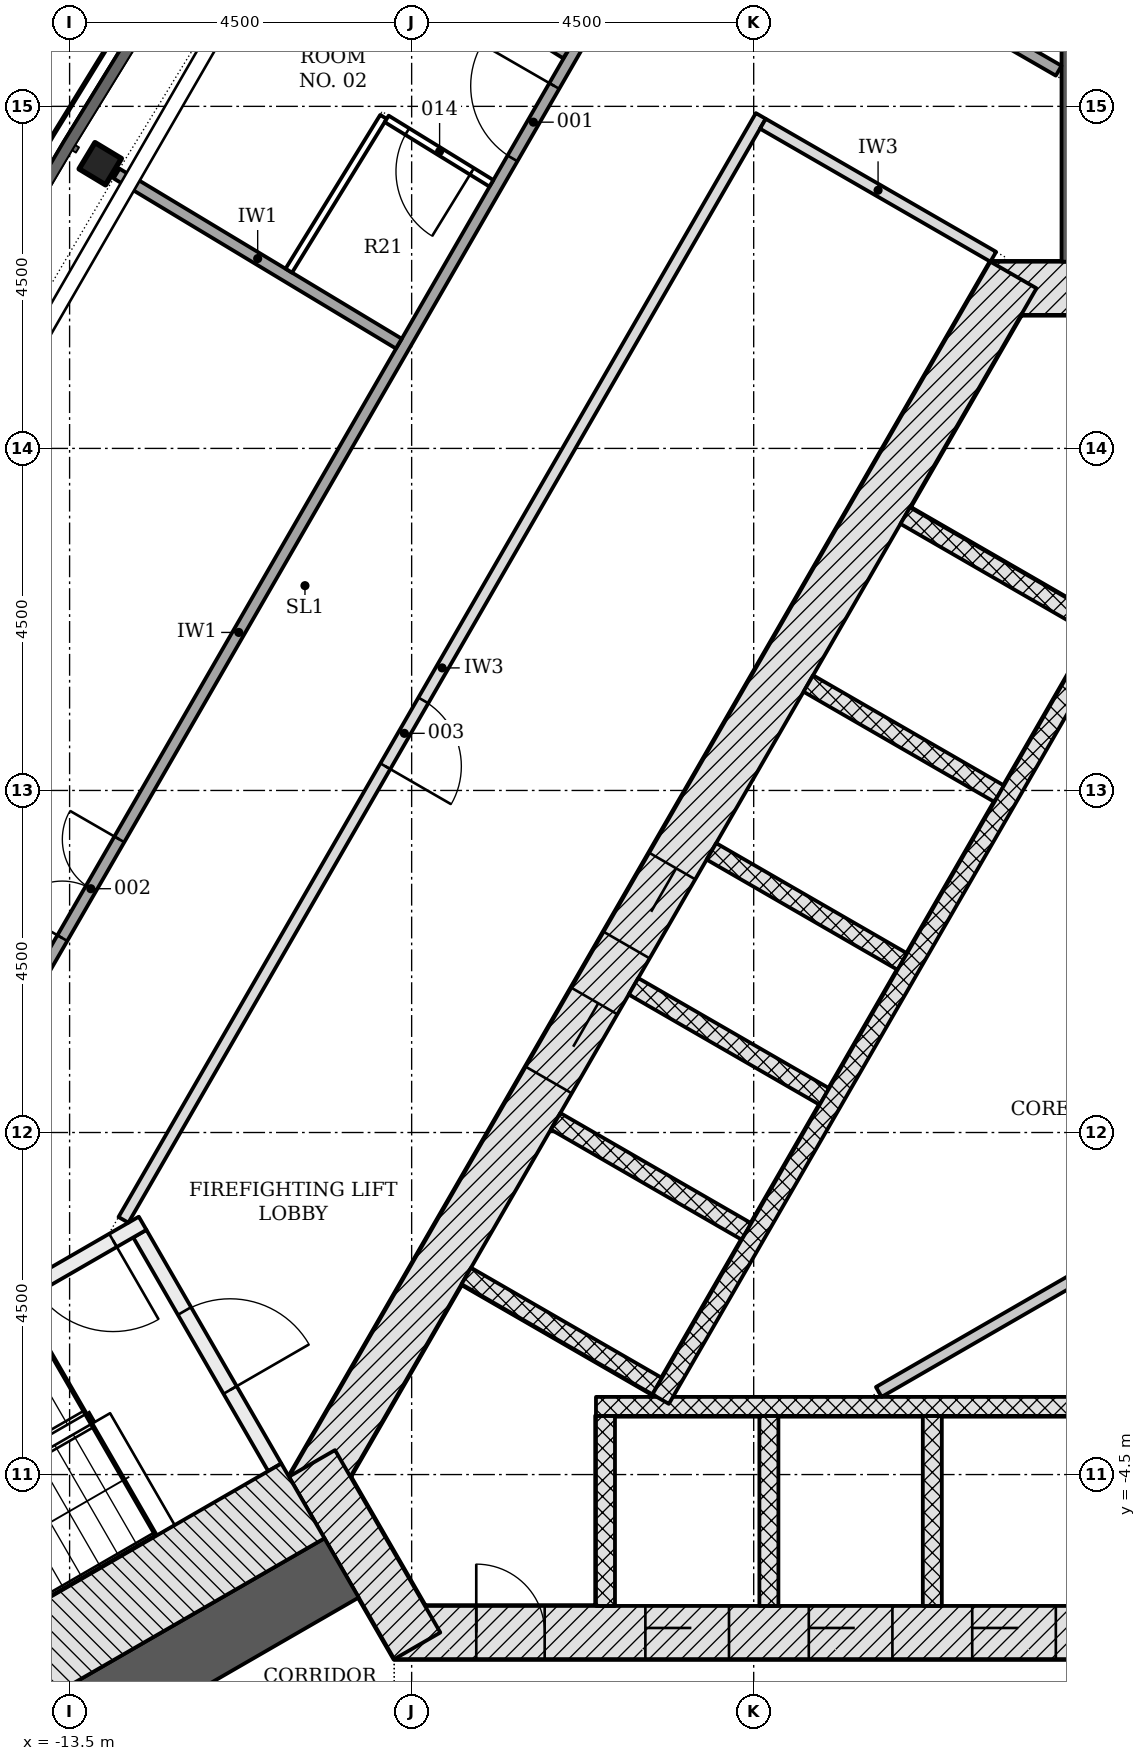
"""IFC4 building model, lengths in metres.
Left out: names, types, materials, properties, quantities, classifications, styles, units other than length and angle.
Written with IfcOpenShell. Run it as: python <this file> out.ifc"""

import sys

from ifc_helpers import new_model, si_unit, direction, frame, frame_2d, origin, origin_2d, place, context, subcontext, project, spatial, rectangle, i_section, extrude, element, fill, save


model = new_model("IFC4")
c1 = context("Model", 3, precision=1e-05, world=origin(), true_north=direction((0.0, 1.0)))
c2 = subcontext(c1, "Body", "Model", "MODEL_VIEW")
j1 = project(units=[si_unit("LENGTHUNIT", "METRE"), si_unit("PLANEANGLEUNIT", "RADIAN")], contexts=[c1])
p1 = place(None, origin())
s1 = spatial("IfcSite", under=j1, at=p1, CompositionType="ELEMENT")
p2 = place(p1, origin())
s2 = spatial("IfcBuilding", under=s1, at=p2, CompositionType="ELEMENT")
p3 = place(p2, frame((0.0, 0.0, 34.8)))
s3 = spatial("IfcBuildingStorey", under=s2, at=p3, CompositionType="ELEMENT", Elevation=34.8)
p4 = place(p3, frame((-9.229, -6.578, -0.2), z_axis=(0.0, 0.0, 1.0), x_axis=(1.0, 0.0, 0.0)))
e1 = element("IfcWall", 1, at=p4, inside=s3, PredefinedType="SHEAR", context=c2, shape_type="SweptSolid", body=[
    extrude(rectangle(XDim=18.458, YDim=0.7, at=frame_2d((9.229, 0.0))), origin(), (0.0, 0.0, 1.0), 3.6),
])
p5 = place(p4, frame((3.304, 0.0, 0.2)))
e2 = element("IfcOpeningElement", 2, at=p5, cuts=e1, PredefinedType="OPENING", context=c2, shape_type="SweptSolid", body=[
    extrude(rectangle(XDim=1.1, YDim=2.1, at=frame_2d((0.55, 1.05))), frame((0.0, 0.36, 0.0), z_axis=(0.0, -1.0, 0.0), x_axis=(1.0, 0.0, 0.0)), (0.0, 0.0, 1.0), 0.72),
])
p6 = place(p4, frame((5.454, 0.0, 0.2)))
e3 = element("IfcOpeningElement", 3, at=p6, cuts=e1, PredefinedType="OPENING", context=c2, shape_type="SweptSolid", body=[
    extrude(rectangle(XDim=1.1, YDim=2.1, at=frame_2d((0.55, 1.05))), frame((0.0, 0.36, 0.0), z_axis=(0.0, -1.0, 0.0), x_axis=(1.0, 0.0, 0.0)), (0.0, 0.0, 1.0), 0.72),
])
p7 = place(p4, frame((7.604, 0.0, 0.2)))
e4 = element("IfcOpeningElement", 4, at=p7, cuts=e1, PredefinedType="OPENING", context=c2, shape_type="SweptSolid", body=[
    extrude(rectangle(XDim=1.1, YDim=2.1, at=frame_2d((0.55, 1.05))), frame((0.0, 0.36, 0.0), z_axis=(0.0, -1.0, 0.0), x_axis=(1.0, 0.0, 0.0)), (0.0, 0.0, 1.0), 0.72),
])
p8 = place(p4, frame((9.754, 0.0, 0.2)))
e5 = element("IfcOpeningElement", 5, at=p8, cuts=e1, PredefinedType="OPENING", context=c2, shape_type="SweptSolid", body=[
    extrude(rectangle(XDim=1.1, YDim=2.1, at=frame_2d((0.55, 1.05))), frame((0.0, 0.36, 0.0), z_axis=(0.0, -1.0, 0.0), x_axis=(1.0, 0.0, 0.0)), (0.0, 0.0, 1.0), 0.72),
])
p9 = place(p4, frame((11.904, 0.0, 0.2)))
e6 = element("IfcOpeningElement", 6, at=p9, cuts=e1, PredefinedType="OPENING", context=c2, shape_type="SweptSolid", body=[
    extrude(rectangle(XDim=1.1, YDim=2.1, at=frame_2d((0.55, 1.05))), frame((0.0, 0.36, 0.0), z_axis=(0.0, -1.0, 0.0), x_axis=(1.0, 0.0, 0.0)), (0.0, 0.0, 1.0), 0.72),
])
p10 = place(p4, frame((14.054, 0.0, 0.2)))
e7 = element("IfcOpeningElement", 7, at=p10, cuts=e1, PredefinedType="OPENING", context=c2, shape_type="SweptSolid", body=[
    extrude(rectangle(XDim=1.1, YDim=2.1, at=frame_2d((0.55, 1.05))), frame((0.0, 0.36, 0.0), z_axis=(0.0, -1.0, 0.0), x_axis=(1.0, 0.0, 0.0)), (0.0, 0.0, 1.0), 0.72),
])
p11 = place(p4, frame((1.079, 0.0, 0.2)))
e8 = element("IfcOpeningElement", 8, at=p11, cuts=e1, PredefinedType="OPENING", context=c2, shape_type="SweptSolid", body=[
    extrude(rectangle(XDim=0.9, YDim=2.1, at=frame_2d((0.45, 1.05))), frame((0.0, 0.36, 0.0), z_axis=(0.0, -1.0, 0.0), x_axis=(1.0, 0.0, 0.0)), (0.0, 0.0, 1.0), 0.72),
])
p12 = place(p3, frame((1.386, 11.106, -0.2), z_axis=(0.0, 0.0, 1.0), x_axis=(-1.0, 0.0, 0.0)))
e9 = element("IfcWall", 9, at=p12, inside=s3, PredefinedType="SHEAR", context=c2, shape_type="SweptSolid", body=[
    extrude(rectangle(XDim=2.771, YDim=0.7, at=frame_2d((1.386, 0.0))), origin(), (0.0, 0.0, 1.0), 3.6),
])
p13 = place(p3, frame((-1.083, 11.281, -0.2), z_axis=(0.0, 0.0, 1.0), x_axis=(-0.500001446645, -0.866024568562, 0.0)))
e10 = element("IfcWall", 10, at=p13, inside=s3, PredefinedType="SHEAR", context=c2, shape_type="SweptSolid", body=[
    extrude(rectangle(XDim=18.458, YDim=0.7, at=frame_2d((9.229, 0.0))), origin(), (0.0, 0.0, 1.0), 3.6),
])
p14 = place(p13, frame((8.979, 0.0, 0.2)))
e11 = element("IfcOpeningElement", 11, at=p14, cuts=e10, PredefinedType="OPENING", context=c2, shape_type="SweptSolid", body=[
    extrude(rectangle(XDim=1.2, YDim=2.1, at=frame_2d((0.6, 1.05))), frame((0.0, 0.36, 0.0), z_axis=(0.0, -1.0, 0.0), x_axis=(1.0, 0.0, 0.0)), (0.0, 0.0, 1.0), 0.72),
])
p15 = place(p13, frame((11.029, 0.0, 0.2)))
e12 = element("IfcOpeningElement", 12, at=p15, cuts=e10, PredefinedType="OPENING", context=c2, shape_type="SweptSolid", body=[
    extrude(rectangle(XDim=1.2, YDim=2.1, at=frame_2d((0.6, 1.05))), frame((0.0, 0.36, 0.0), z_axis=(0.0, -1.0, 0.0), x_axis=(1.0, 0.0, 0.0)), (0.0, 0.0, 1.0), 0.72),
])
p16 = place(p3, frame((-10.311, -4.353, -0.2), z_axis=(0.0, 0.0, 1.0), x_axis=(0.500042739161, -0.866000726912, 0.0)))
e13 = element("IfcWall", 13, at=p16, inside=s3, PredefinedType="SHEAR", context=c2, shape_type="SweptSolid", body=[
    extrude(rectangle(XDim=2.771, YDim=0.7, at=frame_2d((1.386, 0.0))), origin(), (0.0, 0.0, 1.0), 3.6),
])
for number, where, z_axis, x_axis in (
    (14, (0.0, 11.456, -0.2), (0.0, 0.0, 1.0), (0.0, 1.0, 0.0)),
    (15, (-9.922, -5.728, -0.2), (0.0, 0.0, 1.0), (-0.866, -0.5, 0.0)),
):
    element("IfcWall", number, at=place(p3, frame(where, z_axis=z_axis, x_axis=x_axis)), inside=s3, PredefinedType="SHEAR", context=c2, shape_type="SweptSolid", body=[
        extrude(rectangle(XDim=14.309, YDim=0.9, at=frame_2d((7.154, 0.0))), origin(), (0.0, 0.0, 1.0), 3.6),
    ])
p17 = place(p3, frame((-13.097, 12.745, -0.2), z_axis=(0.0, 0.0, 1.0), x_axis=(-0.516129802245, -0.856510377774, 0.0)))
e16 = element("IfcColumn", 16, at=p17, inside=s3, PredefinedType="COLUMN", context=c2, shape_type="SweptSolid", body=[
    extrude(i_section(OverallWidth=0.404, OverallDepth=0.406, WebThickness=0.027, FlangeThickness=0.044, FilletRadius=0.015, at=origin_2d()), origin(), (0.0, 0.0, 1.0), 3.6),
])
for number, where, z_axis, x_axis in (
    (17, (-6.45, -6.228, -0.2), (0.0, 0.0, 1.0), (0.0, 1.0, 0.0)),
    (18, (-4.3, -6.228, -0.2), (0.0, 0.0, 1.0), (0.0, 1.0, 0.0)),
    (19, (-2.15, -6.228, -0.2), (0.0, 0.0, 1.0), (0.0, 1.0, 0.0)),
):
    element("IfcWall", number, at=place(p3, frame(where, z_axis=z_axis, x_axis=x_axis)), inside=s3, PredefinedType="PARTITIONING", context=c2, shape_type="SweptSolid", body=[
        extrude(rectangle(XDim=2.5, YDim=0.25, at=frame_2d((1.25, 0.0))), origin(), (0.0, 0.0, 1.0), 3.6),
    ])
p18 = place(p3, frame((-6.575, -3.603, 0.0), z_axis=(0.0, 0.0, 1.0), x_axis=(1.0, 0.0, 0.0)))
e20 = element("IfcWall", 20, at=p18, inside=s3, PredefinedType="PARTITIONING", context=c2, shape_type="SweptSolid", body=[
    extrude(rectangle(XDim=13.15, YDim=0.25, at=frame_2d((6.575, 0.0))), origin(), (0.0, 0.0, 1.0), 3.4),
])
p19 = place(p3, frame((-2.506, 8.115, -0.2), z_axis=(0.0, 0.0, 1.0), x_axis=(0.865996321171, -0.50005036918, 0.0)))
e21 = element("IfcWall", 21, at=p19, inside=s3, PredefinedType="PARTITIONING", context=c2, shape_type="SweptSolid", body=[
    extrude(rectangle(XDim=2.9, YDim=0.25, at=frame_2d((1.45, 0.0))), origin(), (0.0, 0.0, 1.0), 3.6),
])
for number, where, z_axis, x_axis in (
    (22, (-3.781, 5.907, -0.2), (0.0, 0.0, 1.0), (0.866, -0.5, 0.0)),
    (23, (-5.056, 3.699, -0.2), (0.0, 0.0, 1.0), (0.866, -0.5, 0.0)),
    (24, (-6.081, 1.923, -0.2), (0.0, 0.0, 1.0), (0.866, -0.5, 0.0)),
    (25, (-7.106, 0.148, -0.2), (0.0, 0.0, 1.0), (0.866, -0.5, 0.0)),
    (26, (-8.281, -1.887, -0.2), (0.0, 0.0, 1.0), (0.866, -0.5, 0.0)),
):
    element("IfcWall", number, at=place(p3, frame(where, z_axis=z_axis, x_axis=x_axis)), inside=s3, PredefinedType="PARTITIONING", context=c2, shape_type="SweptSolid", body=[
        extrude(rectangle(XDim=2.9, YDim=0.25, at=frame_2d((1.45, 0.0))), origin(), (0.0, 0.0, 1.0), 3.6),
    ])
p20 = place(p3, frame((0.176, 6.711, 0.0), z_axis=(0.0, 0.0, 1.0), x_axis=(-0.500004227369, -0.866022963098, 0.0)))
e27 = element("IfcWall", 27, at=p20, inside=s3, PredefinedType="PARTITIONING", context=c2, shape_type="SweptSolid", body=[
    extrude(rectangle(XDim=11.8, YDim=0.25, at=frame_2d((5.9, 0.0))), origin(), (0.0, 0.0, 1.0), 3.4),
])
p21 = place(p3, frame((-2.854, -3.413, 0.0), z_axis=(0.0, 0.0, 1.0), x_axis=(0.866030102318, 0.499991861813, 0.0)))
e28 = element("IfcWall", 28, at=p21, inside=s3, PredefinedType="PARTITIONING", context=c2, shape_type="SweptSolid", body=[
    extrude(rectangle(XDim=10.407, YDim=0.15, at=frame_2d((5.204, 0.0))), origin(), (0.0, 0.0, 1.0), 3.4),
])
p22 = place(p21, frame((3.354, 0.0, 0.0)))
e29 = element("IfcOpeningElement", 29, at=p22, cuts=e28, PredefinedType="OPENING", context=c2, shape_type="SweptSolid", body=[
    extrude(rectangle(XDim=0.9, YDim=2.1, at=frame_2d((0.45, 1.05))), frame((0.0, 0.085, 0.0), z_axis=(0.0, -1.0, 0.0), x_axis=(1.0, 0.0, 0.0)), (0.0, 0.0, 1.0), 0.17),
])
p23 = place(p3, frame((-12.576, -1.331, -0.2), z_axis=(0.0, 0.0, 1.0), x_axis=(0.499970499736, -0.8660424351, 0.0)))
e30 = element("IfcWall", 30, at=p23, inside=s3, PredefinedType="SHEAR", context=c2, shape_type="SweptSolid", body=[
    extrude(rectangle(XDim=3.55, YDim=0.2, at=frame_2d((1.775, 0.0))), origin(), (0.0, 0.0, 1.0), 3.6),
])
p24 = place(p23, frame((1.175, 0.0, 0.2)))
e31 = element("IfcOpeningElement", 31, at=p24, cuts=e30, PredefinedType="OPENING", context=c2, shape_type="SweptSolid", body=[
    extrude(rectangle(XDim=1.2, YDim=2.1, at=frame_2d((0.6, 1.05))), frame((0.0, 0.11, 0.0), z_axis=(0.0, -1.0, 0.0), x_axis=(1.0, 0.0, 0.0)), (0.0, 0.0, 1.0), 0.22),
])
p25 = place(p3, frame((-12.539, -1.194, -0.2), z_axis=(0.0, 0.0, 1.0), x_axis=(-0.866045472092, -0.499965239061, 0.0)))
e32 = element("IfcWall", 32, at=p25, inside=s3, PredefinedType="SHEAR", context=c2, shape_type="SweptSolid", body=[
    extrude(rectangle(XDim=5.6, YDim=0.2, at=frame_2d((2.8, 0.0))), origin(), (0.0, 0.0, 1.0), 3.6),
])
p26 = place(p25, frame((0.45, 0.0, 0.2)))
e33 = element("IfcOpeningElement", 33, at=p26, cuts=e32, PredefinedType="OPENING", context=c2, shape_type="SweptSolid", body=[
    extrude(rectangle(XDim=1.2, YDim=2.1, at=frame_2d((0.6, 1.05))), frame((0.0, 0.11, 0.0), z_axis=(0.0, -1.0, 0.0), x_axis=(1.0, 0.0, 0.0)), (0.0, 0.0, 1.0), 0.22),
])
p27 = place(p3, frame((-10.43, -4.847, -0.2), z_axis=(0.0, 0.0, 1.0), x_axis=(-0.866018442252, -0.500012057535, 0.0)))
e34 = element("IfcWall", 34, at=p27, inside=s3, PredefinedType="SHEAR", context=c2, shape_type="SweptSolid", body=[
    extrude(rectangle(XDim=7.2, YDim=1.136, at=frame_2d((3.6, 0.0))), origin(), (0.0, 0.0, 1.0), 3.6),
])
p28 = place(p3, frame((-17.208, -3.699, 0.0), z_axis=(0.0, 0.0, 1.0), x_axis=(0.499997567621, 0.866026808115, 0.0)))
e35 = element("IfcWall", 35, at=p28, inside=s3, PredefinedType="PARTITIONING", context=c2, shape_type="SweptSolid", body=[
    extrude(rectangle(XDim=23.736, YDim=0.15, at=frame_2d((11.868, 0.0))), origin(), (0.0, 0.0, 1.0), 2.768),
])
p29 = place(p28, frame((19.07, 0.0, 0.0)))
e36 = element("IfcOpeningElement", 36, at=p29, cuts=e35, PredefinedType="OPENING", context=c2, shape_type="SweptSolid", body=[
    extrude(rectangle(XDim=1.1, YDim=2.1, at=frame_2d((0.55, 1.05))), frame((0.0, 0.085, 0.0), z_axis=(0.0, -1.0, 0.0), x_axis=(1.0, 0.0, 0.0)), (0.0, 0.0, 1.0), 0.17),
])
p30 = place(p28, frame((7.225, 0.0, 0.0)))
e37 = element("IfcOpeningElement", 37, at=p30, cuts=e35, PredefinedType="OPENING", context=c2, shape_type="SweptSolid", body=[
    extrude(rectangle(XDim=1.5, YDim=2.1, at=frame_2d((0.75, 1.05))), frame((0.0, 0.085, 0.0), z_axis=(0.0, -1.0, 0.0), x_axis=(1.0, 0.0, 0.0)), (0.0, 0.0, 1.0), 0.17),
])
p31 = place(p3, frame((-4.407, 13.374, 0.0), z_axis=(0.0, 0.0, 1.0), x_axis=(-0.499997181693, -0.866027030928, 0.0)))
e38 = element("IfcWall", 38, at=p31, inside=s3, PredefinedType="PARTITIONING", context=c2, shape_type="SweptSolid", body=[
    extrude(rectangle(XDim=16.77, YDim=0.15, at=frame_2d((8.385, 0.0))), origin(), (0.0, 0.0, 1.0), 2.768),
])
p32 = place(p31, frame((8.879, 0.0, 0.0)))
e39 = element("IfcOpeningElement", 39, at=p32, cuts=e38, PredefinedType="OPENING", context=c2, shape_type="SweptSolid", body=[
    extrude(rectangle(XDim=1.0, YDim=2.1, at=frame_2d((0.5, 1.05))), frame((0.0, 0.085, 0.0), z_axis=(0.0, -1.0, 0.0), x_axis=(1.0, 0.0, 0.0)), (0.0, 0.0, 1.0), 0.17),
])
p33 = place(p3, frame((-5.312, 16.755, 0.0), z_axis=(0.0, 0.0, 1.0), x_axis=(0.866028693448, -0.499994302092, 0.0)))
e40 = element("IfcWall", 40, at=p33, inside=s3, PredefinedType="PARTITIONING", context=c2, shape_type="SweptSolid", body=[
    extrude(rectangle(XDim=5.571, YDim=0.15, at=frame_2d((2.786, 0.0))), origin(), (0.0, 0.0, 1.0), 3.4),
])
p34 = place(p33, frame((2.295, 0.0, 0.0)))
e41 = element("IfcOpeningElement", 41, at=p34, cuts=e40, PredefinedType="OPENING", context=c2, shape_type="SweptSolid", body=[
    extrude(rectangle(XDim=1.0, YDim=2.1, at=frame_2d((0.5, 1.05))), frame((0.0, 0.085, 0.0), z_axis=(0.0, -1.0, 0.0), x_axis=(1.0, 0.0, 0.0)), (0.0, 0.0, 1.0), 0.17),
])
p35 = place(p3, frame((-4.379, 13.271, 0.0), z_axis=(0.0, 0.0, 1.0), x_axis=(0.866019471182, -0.500010275428, 0.0)))
e42 = element("IfcWall", 42, at=p35, inside=s3, PredefinedType="PARTITIONING", context=c2, shape_type="SweptSolid", body=[
    extrude(rectangle(XDim=3.5, YDim=0.15, at=frame_2d((1.75, 0.0))), origin(), (0.0, 0.0, 1.0), 3.4),
])
p36 = place(p3, frame((-12.883, 12.616, 0.0), z_axis=(0.0, 0.0, 1.0), x_axis=(0.856527594015, -0.51610123105, 0.0)))
e43 = element("IfcWall", 43, at=p36, inside=s3, PredefinedType="PARTITIONING", context=c2, shape_type="SweptSolid", body=[
    extrude(rectangle(XDim=4.336, YDim=0.15, at=frame_2d((2.168, 0.0))), origin(), (0.0, 0.0, 1.0), 2.768),
])
p37 = place(p3, frame((-10.532, 16.436, 0.0), z_axis=(0.0, 0.0, 1.0), x_axis=(0.846689538327, -0.532087235036, 0.0)))
e44 = element("IfcWall", 44, at=p37, inside=s3, PredefinedType="PARTITIONING", context=c2, shape_type="SweptSolid", body=[
    extrude(rectangle(XDim=4.211, YDim=0.15, at=frame_2d((2.105, 0.0))), origin(), (0.0, 0.0, 1.0), 2.778),
])
p38 = place(p3, frame((-10.616, 11.339, 0.0), z_axis=(0.0, 0.0, 1.0), x_axis=(0.524137571403, 0.85163361033, 0.0)))
e45 = element("IfcWall", 45, at=p38, inside=s3, PredefinedType="PARTITIONING", context=c2, shape_type="SweptSolid", body=[
    extrude(rectangle(XDim=2.375, YDim=0.1, at=frame_2d((1.188, 0.0))), origin(), (0.0, 0.0, 1.0), 2.768),
])
p39 = place(p3, frame((-7.951, 12.488, 0.0), z_axis=(0.0, 0.0, 1.0), x_axis=(-0.851658316705, 0.524097425664, 0.0)))
e46 = element("IfcWall", 46, at=p39, inside=s3, PredefinedType="PARTITIONING", context=c2, shape_type="SweptSolid", body=[
    extrude(rectangle(XDim=1.617, YDim=0.1, at=frame_2d((0.809, 0.0))), origin(), (0.0, 0.0, 1.0), 3.4),
])
p40 = place(p39, frame((0.3, 0.0, 0.0)))
e47 = element("IfcOpeningElement", 47, at=p40, cuts=e46, PredefinedType="OPENING", context=c2, shape_type="SweptSolid", body=[
    extrude(rectangle(XDim=1.0, YDim=2.1, at=frame_2d((0.5, 1.05))), frame((0.0, 0.06, 0.0), z_axis=(0.0, -1.0, 0.0), x_axis=(1.0, 0.0, 0.0)), (0.0, 0.0, 1.0), 0.12),
])
p41 = place(p5, origin())
e48 = element("IfcDoor", 48, at=p41, inside=s3, OperationType="DOUBLE_DOOR_SLIDING", PredefinedType="DOOR", context=c2, shape_type="SweptSolid", body=[
    extrude(rectangle(XDim=1.1, YDim=2.1, at=frame_2d((0.55, 1.05))), frame((0.0, 0.025, 0.0), z_axis=(0.0, -1.0, 0.0), x_axis=(1.0, 0.0, 0.0)), (0.0, 0.0, 1.0), 0.05),
])
fill(e2, e48)
p42 = place(p6, origin())
e49 = element("IfcDoor", 49, at=p42, inside=s3, OperationType="DOUBLE_DOOR_SLIDING", PredefinedType="DOOR", context=c2, shape_type="SweptSolid", body=[
    extrude(rectangle(XDim=1.1, YDim=2.1, at=frame_2d((0.55, 1.05))), frame((0.0, 0.025, 0.0), z_axis=(0.0, -1.0, 0.0), x_axis=(1.0, 0.0, 0.0)), (0.0, 0.0, 1.0), 0.05),
])
fill(e3, e49)
p43 = place(p7, origin())
e50 = element("IfcDoor", 50, at=p43, inside=s3, OperationType="DOUBLE_DOOR_SLIDING", PredefinedType="DOOR", context=c2, shape_type="SweptSolid", body=[
    extrude(rectangle(XDim=1.1, YDim=2.1, at=frame_2d((0.55, 1.05))), frame((0.0, 0.025, 0.0), z_axis=(0.0, -1.0, 0.0), x_axis=(1.0, 0.0, 0.0)), (0.0, 0.0, 1.0), 0.05),
])
fill(e4, e50)
p44 = place(p14, origin())
e51 = element("IfcDoor", 51, at=p44, inside=s3, OperationType="DOUBLE_DOOR_SLIDING", PredefinedType="DOOR", context=c2, shape_type="SweptSolid", body=[
    extrude(rectangle(XDim=1.2, YDim=2.1, at=frame_2d((0.6, 1.05))), frame((0.0, 0.025, 0.0), z_axis=(0.0, -1.0, 0.0), x_axis=(1.0, 0.0, 0.0)), (0.0, 0.0, 1.0), 0.05),
])
fill(e11, e51)
p45 = place(p15, origin())
e52 = element("IfcDoor", 52, at=p45, inside=s3, OperationType="DOUBLE_DOOR_SLIDING", PredefinedType="DOOR", context=c2, shape_type="SweptSolid", body=[
    extrude(rectangle(XDim=1.2, YDim=2.1, at=frame_2d((0.6, 1.05))), frame((0.0, 0.025, 0.0), z_axis=(0.0, -1.0, 0.0), x_axis=(1.0, 0.0, 0.0)), (0.0, 0.0, 1.0), 0.05),
])
fill(e12, e52)
p46 = place(p11, origin())
e53 = element("IfcDoor", 53, at=p46, inside=s3, OperationType="SINGLE_SWING_LEFT", PredefinedType="DOOR", context=c2, shape_type="SweptSolid", body=[
    extrude(rectangle(XDim=0.9, YDim=2.1, at=frame_2d((0.45, 1.05))), frame((0.0, 0.075, 0.0), z_axis=(0.0, -1.0, 0.0), x_axis=(1.0, 0.0, 0.0)), (0.0, 0.0, 1.0), 0.15),
])
fill(e8, e53)
p47 = place(p24, origin())
e54 = element("IfcDoor", 54, at=p47, inside=s3, OperationType="SINGLE_SWING_RIGHT", PredefinedType="DOOR", context=c2, shape_type="SweptSolid", body=[
    extrude(rectangle(XDim=1.2, YDim=2.1, at=frame_2d((0.6, 1.05))), frame((0.0, 0.025, 0.0), z_axis=(0.0, -1.0, 0.0), x_axis=(1.0, 0.0, 0.0)), (0.0, 0.0, 1.0), 0.05),
])
fill(e31, e54)
p48 = place(p26, origin())
e55 = element("IfcDoor", 55, at=p48, inside=s3, OperationType="SINGLE_SWING_LEFT", PredefinedType="DOOR", context=c2, shape_type="SweptSolid", body=[
    extrude(rectangle(XDim=1.2, YDim=2.1, at=frame_2d((0.6, 1.05))), frame((0.0, 0.025, 0.0), z_axis=(0.0, -1.0, 0.0), x_axis=(1.0, 0.0, 0.0)), (0.0, 0.0, 1.0), 0.05),
])
fill(e33, e55)
p49 = place(p29, origin())
e56 = element("IfcDoor", 56, at=p49, inside=s3, OperationType="SINGLE_SWING_RIGHT", PredefinedType="DOOR", context=c2, shape_type="SweptSolid", body=[
    extrude(rectangle(XDim=1.1, YDim=2.1, at=frame_2d((0.55, 1.05))), frame((0.0, 0.025, 0.0), z_axis=(0.0, -1.0, 0.0), x_axis=(1.0, 0.0, 0.0)), (0.0, 0.0, 1.0), 0.05),
])
fill(e36, e56)
p50 = place(p30, origin())
e57 = element("IfcDoor", 57, at=p50, inside=s3, OperationType="DOUBLE_DOOR_SINGLE_SWING", PredefinedType="DOOR", context=c2, shape_type="SweptSolid", body=[
    extrude(rectangle(XDim=1.5, YDim=2.1, at=frame_2d((0.75, 1.05))), frame((0.0, 0.025, 0.0), z_axis=(0.0, -1.0, 0.0), x_axis=(1.0, 0.0, 0.0)), (0.0, 0.0, 1.0), 0.05),
])
fill(e37, e57)
p51 = place(p32, origin())
e58 = element("IfcDoor", 58, at=p51, inside=s3, OperationType="SINGLE_SWING_RIGHT", PredefinedType="DOOR", context=c2, shape_type="SweptSolid", body=[
    extrude(rectangle(XDim=1.0, YDim=2.1, at=frame_2d((0.5, 1.05))), frame((0.0, 0.025, 0.0), z_axis=(0.0, -1.0, 0.0), x_axis=(1.0, 0.0, 0.0)), (0.0, 0.0, 1.0), 0.05),
])
fill(e39, e58)
p52 = place(p40, origin())
e59 = element("IfcDoor", 59, at=p52, inside=s3, OperationType="SINGLE_SWING_LEFT", PredefinedType="DOOR", context=c2, shape_type="SweptSolid", body=[
    extrude(rectangle(XDim=1.0, YDim=2.1, at=frame_2d((0.5, 1.05))), frame((0.0, 0.025, 0.0), z_axis=(0.0, -1.0, 0.0), x_axis=(1.0, 0.0, 0.0)), (0.0, 0.0, 1.0), 0.05),
])
fill(e47, e59)
save(model, sys.argv[1])
